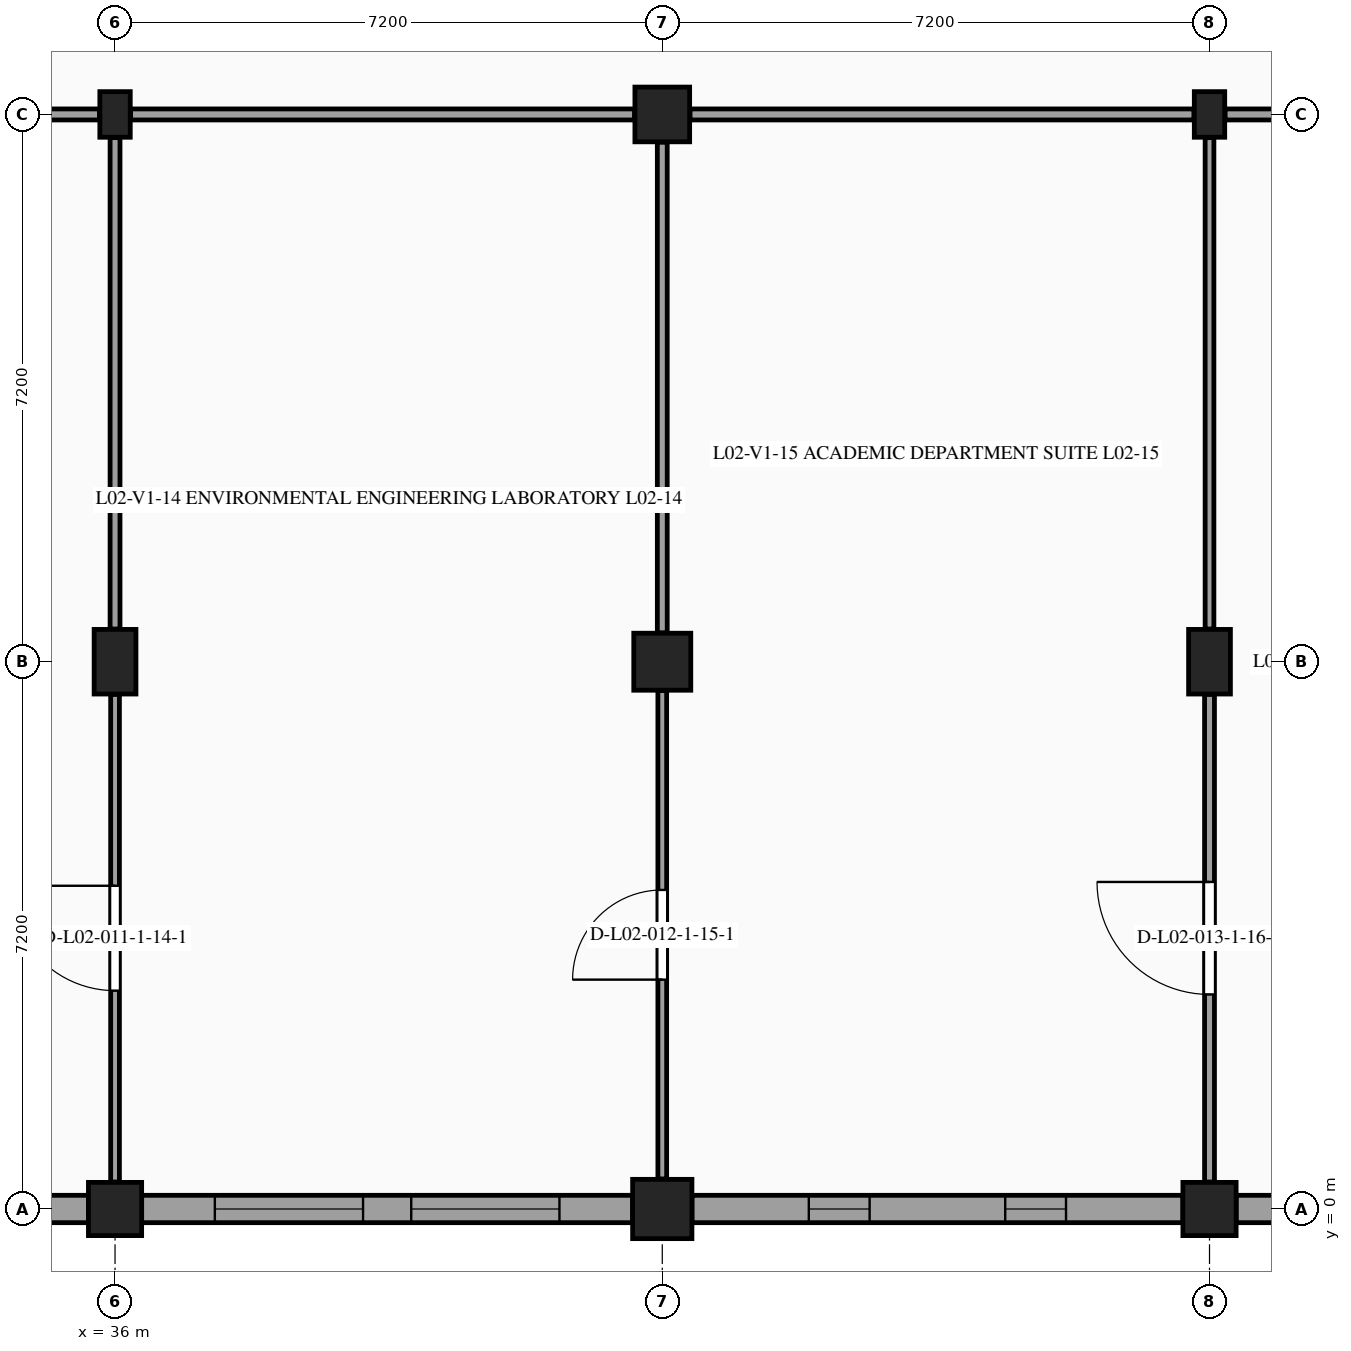
"""IFC4 building model, lengths in metres.
Left out: names, types, materials, properties, quantities, classifications, styles, units other than length and angle.
Written with IfcOpenShell. Run it as: python <this file> out.ifc"""

import sys

from ifc_helpers import new_model, si_unit, direction, frame, frame_2d, origin, origin_2d, place, context, subcontext, project, spatial, rectangle, extrude, element, fill, save


model = new_model("IFC4")
c1 = context("Model", 3, precision=1e-05, world=origin(), true_north=direction((0.0, 1.0)))
c2 = subcontext(c1, "Body", "Model", "MODEL_VIEW")
j1 = project(units=[si_unit("LENGTHUNIT", "METRE"), si_unit("PLANEANGLEUNIT", "RADIAN")], contexts=[c1])
p1 = place(None, origin())
s1 = spatial("IfcSite", under=j1, at=p1, CompositionType="ELEMENT")
p2 = place(p1, origin())
s2 = spatial("IfcBuilding", under=s1, at=p2, CompositionType="ELEMENT")
p3 = place(p2, frame((0.0, 0.0, 9.9)))
s3 = spatial("IfcBuildingStorey", under=s2, at=p3, CompositionType="ELEMENT", Elevation=9.9)
p4 = place(p3, frame((36.0, 0.0, 0.0), z_axis=(0.0, 0.0, 1.0), x_axis=(1.0, 0.0, 0.0)))
e1 = element("IfcColumn", 1, at=p4, inside=s3, PredefinedType="COLUMN", context=c2, shape_type="SweptSolid", body=[
    extrude(rectangle(XDim=0.7, YDim=0.7, at=origin_2d()), origin(), (0.0, 0.0, 1.0), 4.5),
])
p5 = place(p3, frame((36.0, 7.2, 0.0), z_axis=(0.0, 0.0, 1.0), x_axis=(1.0, 0.0, 0.0)))
e2 = element("IfcColumn", 2, at=p5, inside=s3, PredefinedType="COLUMN", context=c2, shape_type="SweptSolid", body=[
    extrude(rectangle(XDim=0.55, YDim=0.85, at=origin_2d()), origin(), (0.0, 0.0, 1.0), 4.5),
])
p6 = place(p3, frame((36.0, 14.4, 0.0), z_axis=(0.0, 0.0, 1.0), x_axis=(1.0, 0.0, 0.0)))
e3 = element("IfcColumn", 3, at=p6, inside=s3, PredefinedType="PILASTER", context=c2, shape_type="SweptSolid", body=[
    extrude(rectangle(XDim=0.4, YDim=0.6, at=origin_2d()), origin(), (0.0, 0.0, 1.0), 4.5),
])
p7 = place(p3, frame((43.2, 0.0, 0.0), z_axis=(0.0, 0.0, 1.0), x_axis=(1.0, 0.0, 0.0)))
e4 = element("IfcColumn", 4, at=p7, inside=s3, PredefinedType="COLUMN", context=c2, shape_type="SweptSolid", body=[
    extrude(rectangle(XDim=0.78, YDim=0.78, at=origin_2d()), origin(), (0.0, 0.0, 1.0), 4.5),
])
p8 = place(p3, frame((43.2, 7.2, 0.0), z_axis=(0.0, 0.0, 1.0), x_axis=(1.0, 0.0, 0.0)))
e5 = element("IfcColumn", 5, at=p8, inside=s3, PredefinedType="COLUMN", context=c2, shape_type="SweptSolid", body=[
    extrude(rectangle(XDim=0.75, YDim=0.75, at=origin_2d()), origin(), (0.0, 0.0, 1.0), 4.5),
])
p9 = place(p3, frame((43.2, 14.4, 0.0), z_axis=(0.0, 0.0, 1.0), x_axis=(1.0, 0.0, 0.0)))
e6 = element("IfcColumn", 6, at=p9, inside=s3, PredefinedType="COLUMN", context=c2, shape_type="SweptSolid", body=[
    extrude(rectangle(XDim=0.72, YDim=0.72, at=origin_2d()), origin(), (0.0, 0.0, 1.0), 4.5),
])
p10 = place(p3, frame((50.4, 0.0, 0.0), z_axis=(0.0, 0.0, 1.0), x_axis=(1.0, 0.0, 0.0)))
e7 = element("IfcColumn", 7, at=p10, inside=s3, PredefinedType="COLUMN", context=c2, shape_type="SweptSolid", body=[
    extrude(rectangle(XDim=0.7, YDim=0.7, at=origin_2d()), origin(), (0.0, 0.0, 1.0), 4.5),
])
p11 = place(p3, frame((50.4, 7.2, 0.0), z_axis=(0.0, 0.0, 1.0), x_axis=(1.0, 0.0, 0.0)))
e8 = element("IfcColumn", 8, at=p11, inside=s3, PredefinedType="COLUMN", context=c2, shape_type="SweptSolid", body=[
    extrude(rectangle(XDim=0.55, YDim=0.85, at=origin_2d()), origin(), (0.0, 0.0, 1.0), 4.5),
])
p12 = place(p3, frame((50.4, 14.4, 0.0), z_axis=(0.0, 0.0, 1.0), x_axis=(1.0, 0.0, 0.0)))
e9 = element("IfcColumn", 9, at=p12, inside=s3, PredefinedType="PILASTER", context=c2, shape_type="SweptSolid", body=[
    extrude(rectangle(XDim=0.4, YDim=0.6, at=origin_2d()), origin(), (0.0, 0.0, 1.0), 4.5),
])
p13 = place(p3, frame((57.225, 0.0, 0.0), z_axis=(0.0, 0.0, 1.0), x_axis=(-1.0, 0.0, 0.0)))
e10 = element("IfcWall", 10, at=p13, inside=s3, PredefinedType="STANDARD", context=c2, shape_type="SweptSolid", body=[
    extrude(rectangle(XDim=6.475, YDim=0.36, at=frame_2d((3.238, 0.0))), origin(), (0.0, 0.0, 1.0), 3.46),
])
p14 = place(p13, frame((1.268, 0.0, 1.15)))
e11 = element("IfcOpeningElement", 11, at=p14, cuts=e10, PredefinedType="OPENING", context=c2, shape_type="SweptSolid", body=[
    extrude(rectangle(XDim=1.35, YDim=1.1, at=frame_2d((0.675, 0.55))), frame((0.0, 0.19, 0.0), z_axis=(0.0, -1.0, 0.0), x_axis=(1.0, 0.0, 0.0)), (0.0, 0.0, 1.0), 0.38),
])
p15 = place(p13, frame((3.857, 0.0, 1.15)))
e12 = element("IfcOpeningElement", 12, at=p15, cuts=e10, PredefinedType="OPENING", context=c2, shape_type="SweptSolid", body=[
    extrude(rectangle(XDim=1.35, YDim=1.1, at=frame_2d((0.675, 0.55))), frame((0.0, 0.19, 0.0), z_axis=(0.0, -1.0, 0.0), x_axis=(1.0, 0.0, 0.0)), (0.0, 0.0, 1.0), 0.38),
])
p16 = place(p3, frame((50.05, 0.0, 0.0), z_axis=(0.0, 0.0, 1.0), x_axis=(-1.0, 0.0, 0.0)))
e13 = element("IfcWall", 13, at=p16, inside=s3, PredefinedType="STANDARD", context=c2, shape_type="SweptSolid", body=[
    extrude(rectangle(XDim=6.46, YDim=0.36, at=frame_2d((3.23, 0.0))), origin(), (0.0, 0.0, 1.0), 3.46),
])
p17 = place(p16, frame((1.538, 0.0, 1.15)))
e14 = element("IfcOpeningElement", 14, at=p17, cuts=e13, PredefinedType="OPENING", context=c2, shape_type="SweptSolid", body=[
    extrude(rectangle(XDim=0.8, YDim=1.5, at=frame_2d((0.4, 0.75))), frame((0.0, 0.19, 0.0), z_axis=(0.0, -1.0, 0.0), x_axis=(1.0, 0.0, 0.0)), (0.0, 0.0, 1.0), 0.38),
])
p18 = place(p16, frame((4.122, 0.0, 1.15)))
e15 = element("IfcOpeningElement", 15, at=p18, cuts=e13, PredefinedType="OPENING", context=c2, shape_type="SweptSolid", body=[
    extrude(rectangle(XDim=0.8, YDim=1.5, at=frame_2d((0.4, 0.75))), frame((0.0, 0.19, 0.0), z_axis=(0.0, -1.0, 0.0), x_axis=(1.0, 0.0, 0.0)), (0.0, 0.0, 1.0), 0.38),
])
p19 = place(p3, frame((42.81, 0.0, 0.0), z_axis=(0.0, 0.0, 1.0), x_axis=(-1.0, 0.0, 0.0)))
e16 = element("IfcWall", 16, at=p19, inside=s3, PredefinedType="STANDARD", context=c2, shape_type="SweptSolid", body=[
    extrude(rectangle(XDim=6.46, YDim=0.36, at=frame_2d((3.23, 0.0))), origin(), (0.0, 0.0, 1.0), 3.46),
])
p20 = place(p19, frame((0.963, 0.0, 1.15)))
e17 = element("IfcOpeningElement", 17, at=p20, cuts=e16, PredefinedType="OPENING", context=c2, shape_type="SweptSolid", body=[
    extrude(rectangle(XDim=1.95, YDim=1.4, at=frame_2d((0.975, 0.7))), frame((0.0, 0.19, 0.0), z_axis=(0.0, -1.0, 0.0), x_axis=(1.0, 0.0, 0.0)), (0.0, 0.0, 1.0), 0.38),
])
p21 = place(p19, frame((3.547, 0.0, 1.15)))
e18 = element("IfcOpeningElement", 18, at=p21, cuts=e16, PredefinedType="OPENING", context=c2, shape_type="SweptSolid", body=[
    extrude(rectangle(XDim=1.95, YDim=1.4, at=frame_2d((0.975, 0.7))), frame((0.0, 0.19, 0.0), z_axis=(0.0, -1.0, 0.0), x_axis=(1.0, 0.0, 0.0)), (0.0, 0.0, 1.0), 0.38),
])
p22 = place(p3, frame((35.65, 0.0, 0.0), z_axis=(0.0, 0.0, 1.0), x_axis=(-1.0, 0.0, 0.0)))
e19 = element("IfcWall", 19, at=p22, inside=s3, PredefinedType="STANDARD", context=c2, shape_type="SweptSolid", body=[
    extrude(rectangle(XDim=6.46, YDim=0.36, at=frame_2d((3.23, 0.0))), origin(), (0.0, 0.0, 1.0), 3.47),
])
p23 = place(p22, frame((1.063, 0.0, 1.15)))
e20 = element("IfcOpeningElement", 20, at=p23, cuts=e19, PredefinedType="OPENING", context=c2, shape_type="SweptSolid", body=[
    extrude(rectangle(XDim=1.75, YDim=1.4, at=frame_2d((0.875, 0.7))), frame((0.0, 0.19, 0.0), z_axis=(0.0, -1.0, 0.0), x_axis=(1.0, 0.0, 0.0)), (0.0, 0.0, 1.0), 0.38),
])
p24 = place(p22, frame((3.647, 0.0, 1.15)))
e21 = element("IfcOpeningElement", 21, at=p24, cuts=e19, PredefinedType="OPENING", context=c2, shape_type="SweptSolid", body=[
    extrude(rectangle(XDim=1.75, YDim=1.4, at=frame_2d((0.875, 0.7))), frame((0.0, 0.19, 0.0), z_axis=(0.0, -1.0, 0.0), x_axis=(1.0, 0.0, 0.0)), (0.0, 0.0, 1.0), 0.38),
])
p25 = place(p3, frame((36.0, 0.355, 0.0), z_axis=(0.0, 0.0, 1.0), x_axis=(0.0, 1.0, 0.0)))
e22 = element("IfcWall", 22, at=p25, inside=s3, PredefinedType="PARTITIONING", context=c2, shape_type="SweptSolid", body=[
    extrude(rectangle(XDim=6.415, YDim=0.115, at=frame_2d((3.208, 0.0))), origin(), (0.0, 0.0, 1.0), 3.53),
])
p26 = place(p25, frame((2.518, 0.0, 0.0)))
e23 = element("IfcOpeningElement", 23, at=p26, cuts=e22, PredefinedType="OPENING", context=c2, shape_type="SweptSolid", body=[
    extrude(rectangle(XDim=1.38, YDim=2.22, at=frame_2d((0.69, 1.11))), frame((0.0, 0.067, 0.0), z_axis=(0.0, -1.0, 0.0), x_axis=(1.0, 0.0, 0.0)), (0.0, 0.0, 1.0), 0.135),
])
p27 = place(p3, frame((36.0, 7.63, 0.0), z_axis=(0.0, 0.0, 1.0), x_axis=(0.0, 1.0, 0.0)))
e24 = element("IfcWall", 24, at=p27, inside=s3, PredefinedType="PARTITIONING", context=c2, shape_type="SweptSolid", body=[
    extrude(rectangle(XDim=6.465, YDim=0.13, at=frame_2d((3.232, 0.0))), origin(), (0.0, 0.0, 1.0), 3.525),
])
p28 = place(p3, frame((29.165, 14.4, 0.0), z_axis=(0.0, 0.0, 1.0), x_axis=(1.0, 0.0, 0.0)))
e25 = element("IfcWall", 25, at=p28, inside=s3, PredefinedType="PARTITIONING", context=c2, shape_type="SweptSolid", body=[
    extrude(rectangle(XDim=6.63, YDim=0.145, at=frame_2d((3.315, 0.0))), origin(), (0.0, 0.0, 1.0), 3.565),
])
p29 = place(p3, frame((43.2, 0.395, 0.0), z_axis=(0.0, 0.0, 1.0), x_axis=(0.0, 1.0, 0.0)))
e26 = element("IfcWall", 26, at=p29, inside=s3, PredefinedType="PARTITIONING", context=c2, shape_type="SweptSolid", body=[
    extrude(rectangle(XDim=6.425, YDim=0.115, at=frame_2d((3.212, 0.0))), origin(), (0.0, 0.0, 1.0), 3.53),
])
p30 = place(p29, frame((2.623, 0.0, 0.0)))
e27 = element("IfcOpeningElement", 27, at=p30, cuts=e26, PredefinedType="OPENING", context=c2, shape_type="SweptSolid", body=[
    extrude(rectangle(XDim=1.18, YDim=2.18, at=frame_2d((0.59, 1.09))), frame((0.0, 0.067, 0.0), z_axis=(0.0, -1.0, 0.0), x_axis=(1.0, 0.0, 0.0)), (0.0, 0.0, 1.0), 0.135),
])
p31 = place(p3, frame((43.2, 7.58, 0.0), z_axis=(0.0, 0.0, 1.0), x_axis=(0.0, 1.0, 0.0)))
e28 = element("IfcWall", 28, at=p31, inside=s3, PredefinedType="PARTITIONING", context=c2, shape_type="SweptSolid", body=[
    extrude(rectangle(XDim=6.455, YDim=0.13, at=frame_2d((3.228, 0.0))), origin(), (0.0, 0.0, 1.0), 3.525),
])
p32 = place(p3, frame((36.205, 14.4, 0.0), z_axis=(0.0, 0.0, 1.0), x_axis=(1.0, 0.0, 0.0)))
e29 = element("IfcWall", 29, at=p32, inside=s3, PredefinedType="PARTITIONING", context=c2, shape_type="SweptSolid", body=[
    extrude(rectangle(XDim=6.63, YDim=0.145, at=frame_2d((3.315, 0.0))), origin(), (0.0, 0.0, 1.0), 3.565),
])
p33 = place(p3, frame((50.4, 0.355, 0.0), z_axis=(0.0, 0.0, 1.0), x_axis=(0.0, 1.0, 0.0)))
e30 = element("IfcWall", 30, at=p33, inside=s3, PredefinedType="PARTITIONING", context=c2, shape_type="SweptSolid", body=[
    extrude(rectangle(XDim=6.415, YDim=0.13, at=frame_2d((3.208, 0.0))), origin(), (0.0, 0.0, 1.0), 3.53),
])
p34 = place(p33, frame((2.468, 0.0, 0.0)))
e31 = element("IfcOpeningElement", 31, at=p34, cuts=e30, PredefinedType="OPENING", context=c2, shape_type="SweptSolid", body=[
    extrude(rectangle(XDim=1.48, YDim=2.28, at=frame_2d((0.74, 1.14))), frame((0.0, 0.075, 0.0), z_axis=(0.0, -1.0, 0.0), x_axis=(1.0, 0.0, 0.0)), (0.0, 0.0, 1.0), 0.15),
])
p35 = place(p3, frame((50.4, 7.63, 0.0), z_axis=(0.0, 0.0, 1.0), x_axis=(0.0, 1.0, 0.0)))
e32 = element("IfcWall", 32, at=p35, inside=s3, PredefinedType="PARTITIONING", context=c2, shape_type="SweptSolid", body=[
    extrude(rectangle(XDim=6.465, YDim=0.115, at=frame_2d((3.232, 0.0))), origin(), (0.0, 0.0, 1.0), 3.525),
])
p36 = place(p3, frame((43.565, 14.4, 0.0), z_axis=(0.0, 0.0, 1.0), x_axis=(1.0, 0.0, 0.0)))
e33 = element("IfcWall", 33, at=p36, inside=s3, PredefinedType="PARTITIONING", context=c2, shape_type="SweptSolid", body=[
    extrude(rectangle(XDim=6.63, YDim=0.145, at=frame_2d((3.315, 0.0))), origin(), (0.0, 0.0, 1.0), 3.575),
])
p37 = place(p3, frame((50.605, 14.4, 0.0), z_axis=(0.0, 0.0, 1.0), x_axis=(1.0, 0.0, 0.0)))
e34 = element("IfcWall", 34, at=p37, inside=s3, PredefinedType="PARTITIONING", context=c2, shape_type="SweptSolid", body=[
    extrude(rectangle(XDim=6.615, YDim=0.145, at=frame_2d((3.308, 0.0))), origin(), (0.0, 0.0, 1.0), 3.415),
])
p38 = place(p17, origin())
e35 = element("IfcWindow", 35, at=p38, inside=s3, PartitioningType="SINGLE_PANEL", PredefinedType="WINDOW", context=c2, shape_type="SweptSolid", body=[
    extrude(rectangle(XDim=0.8, YDim=1.5, at=frame_2d((0.4, 0.75))), frame((0.0, -0.08, 0.0), z_axis=(0.0, -1.0, 0.0), x_axis=(1.0, 0.0, 0.0)), (0.0, 0.0, 1.0), 0.06),
])
fill(e14, e35)
p39 = place(p18, origin())
e36 = element("IfcWindow", 36, at=p39, inside=s3, PartitioningType="SINGLE_PANEL", PredefinedType="WINDOW", context=c2, shape_type="SweptSolid", body=[
    extrude(rectangle(XDim=0.8, YDim=1.5, at=frame_2d((0.4, 0.75))), frame((0.0, -0.08, 0.0), z_axis=(0.0, -1.0, 0.0), x_axis=(1.0, 0.0, 0.0)), (0.0, 0.0, 1.0), 0.06),
])
fill(e15, e36)
p40 = place(p20, origin())
e37 = element("IfcWindow", 37, at=p40, inside=s3, PartitioningType="SINGLE_PANEL", PredefinedType="WINDOW", context=c2, shape_type="SweptSolid", body=[
    extrude(rectangle(XDim=1.95, YDim=1.4, at=frame_2d((0.975, 0.7))), frame((0.0, -0.08, 0.0), z_axis=(0.0, -1.0, 0.0), x_axis=(1.0, 0.0, 0.0)), (0.0, 0.0, 1.0), 0.06),
])
fill(e17, e37)
p41 = place(p21, origin())
e38 = element("IfcWindow", 38, at=p41, inside=s3, PartitioningType="SINGLE_PANEL", PredefinedType="WINDOW", context=c2, shape_type="SweptSolid", body=[
    extrude(rectangle(XDim=1.95, YDim=1.4, at=frame_2d((0.975, 0.7))), frame((0.0, -0.08, 0.0), z_axis=(0.0, -1.0, 0.0), x_axis=(1.0, 0.0, 0.0)), (0.0, 0.0, 1.0), 0.06),
])
fill(e18, e38)
p42 = place(p26, origin())
e39 = element("IfcDoor", 39, at=p42, inside=s3, OperationType="SINGLE_SWING_RIGHT", PredefinedType="DOOR", context=c2, shape_type="SweptSolid", body=[
    extrude(rectangle(XDim=1.38, YDim=2.22, at=frame_2d((0.69, 1.11))), frame((0.0, 0.025, 0.0), z_axis=(0.0, -1.0, 0.0), x_axis=(1.0, 0.0, 0.0)), (0.0, 0.0, 1.0), 0.05),
])
fill(e23, e39)
p43 = place(p30, origin())
e40 = element("IfcDoor", 40, at=p43, inside=s3, OperationType="SINGLE_SWING_LEFT", PredefinedType="DOOR", context=c2, shape_type="SweptSolid", body=[
    extrude(rectangle(XDim=1.18, YDim=2.18, at=frame_2d((0.59, 1.09))), frame((0.0, 0.025, 0.0), z_axis=(0.0, -1.0, 0.0), x_axis=(1.0, 0.0, 0.0)), (0.0, 0.0, 1.0), 0.05),
])
fill(e27, e40)
p44 = place(p34, origin())
e41 = element("IfcDoor", 41, at=p44, inside=s3, OperationType="SINGLE_SWING_RIGHT", PredefinedType="DOOR", context=c2, shape_type="SweptSolid", body=[
    extrude(rectangle(XDim=1.48, YDim=2.28, at=frame_2d((0.74, 1.14))), frame((0.0, 0.025, 0.0), z_axis=(0.0, -1.0, 0.0), x_axis=(1.0, 0.0, 0.0)), (0.0, 0.0, 1.0), 0.05),
])
fill(e31, e41)
save(model, sys.argv[1])
